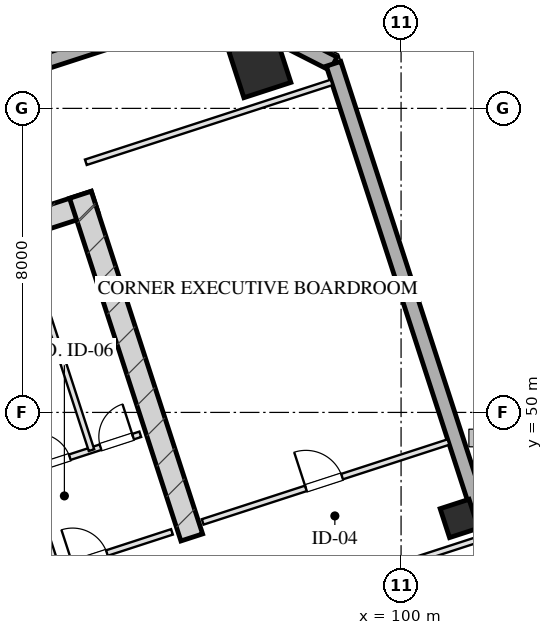
"""IFC4 building model, lengths in metres.
Left out: names, types, materials, properties, quantities, classifications, styles, units other than length and angle.
Written with IfcOpenShell. Run it as: python <this file> out.ifc"""

import sys

from ifc_helpers import new_model, si_unit, direction, frame, frame_2d, origin, origin_2d, place, context, subcontext, project, spatial, rectangle, hollow_rectangle, extrude, element, fill, save


model = new_model("IFC4")
c1 = context("Model", 3, precision=1e-05, world=origin(), true_north=direction((0.0, 1.0)))
c2 = subcontext(c1, "Body", "Model", "MODEL_VIEW")
j1 = project(units=[si_unit("LENGTHUNIT", "METRE"), si_unit("PLANEANGLEUNIT", "RADIAN")], contexts=[c1])
p1 = place(None, origin())
s1 = spatial("IfcSite", under=j1, at=p1, CompositionType="ELEMENT")
p2 = place(p1, origin())
s2 = spatial("IfcBuilding", under=s1, at=p2, CompositionType="ELEMENT")
p3 = place(p2, frame((0.0, 0.0, 163.3)))
s3 = spatial("IfcBuildingStorey", under=s2, at=p3, CompositionType="ELEMENT", Elevation=163.3)
p4 = place(p3, frame((76.344, 50.466, 0.0), z_axis=(0.0, 0.0, 1.0), x_axis=(0.951055727519, 0.309019421968, 0.0)))
e1 = element("IfcWall", 1, at=p4, inside=s3, PredefinedType="SHEAR", context=c2, shape_type="SweptSolid", body=[
    extrude(rectangle(XDim=16.4, YDim=0.6, at=frame_2d((8.2, 0.0))), origin(), (0.0, 0.0, 1.0), 3.45),
])
p5 = place(p3, frame((94.492, 46.71, 0.0), z_axis=(0.0, 0.0, 1.0), x_axis=(-0.309010370028, 0.95105866865, 0.0)))
e2 = element("IfcWall", 2, at=p5, inside=s3, PredefinedType="SHEAR", context=c2, shape_type="SweptSolid", body=[
    extrude(rectangle(XDim=9.48, YDim=0.6, at=frame_2d((4.74, 0.0))), origin(), (0.0, 0.0, 1.0), 3.45),
])
p6 = place(p3, frame((96.281, 59.099, 0.0), z_axis=(0.0, 0.0, 1.0), x_axis=(0.951056516295, 0.309016994375, 0.0)))
e3 = element("IfcColumn", 3, at=p6, inside=s3, PredefinedType="COLUMN", context=c2, shape_type="SweptSolid", body=[
    extrude(hollow_rectangle(XDim=1.3, YDim=1.3, WallThickness=0.045, at=origin_2d()), origin(), (0.0, 0.0, 1.0), 3.451),
])
p7 = place(p3, frame((101.532, 47.21, 0.0), z_axis=(0.0, 0.0, 1.0), x_axis=(0.951056516295, 0.309016994375, 0.0)))
e4 = element("IfcColumn", 4, at=p7, inside=s3, PredefinedType="COLUMN", context=c2, shape_type="SweptSolid", body=[
    extrude(hollow_rectangle(XDim=0.8, YDim=0.8, WallThickness=0.028, at=origin_2d()), origin(), (0.0, 0.0, 1.0), 3.451),
])
p8 = place(p3, frame((70.092, 52.556, 0.0), z_axis=(0.0, 0.0, 1.0), x_axis=(0.951057580055, 0.30901372044, 0.0)))
e5 = element("IfcWall", 5, at=p8, inside=s3, PredefinedType="SOLIDWALL", context=c2, shape_type="SweptSolid", body=[
    extrude(rectangle(XDim=26.4, YDim=0.4, at=frame_2d((13.2, 0.0))), origin(), (0.0, 0.0, 1.0), 2.61),
])
p9 = place(p3, frame((95.199, 60.714, 0.0), z_axis=(0.0, 0.0, 1.0), x_axis=(0.891020832027, -0.453962417932, 0.0)))
e6 = element("IfcWall", 6, at=p9, inside=s3, PredefinedType="SOLIDWALL", context=c2, shape_type="SweptSolid", body=[
    extrude(rectangle(XDim=3.394, YDim=0.4, at=frame_2d((1.697, 0.0))), origin(), (0.0, 0.0, 1.0), 2.61),
])
p10 = place(p3, frame((98.224, 59.173, 0.0), z_axis=(0.0, 0.0, 1.0), x_axis=(0.309014228706, -0.951057414911, 0.0)))
e7 = element("IfcWall", 7, at=p10, inside=s3, PredefinedType="SOLIDWALL", context=c2, shape_type="SweptSolid", body=[
    extrude(rectangle(XDim=42.8, YDim=0.4, at=frame_2d((21.4, 0.0))), origin(), (0.0, 0.0, 1.0), 2.61),
])
p11 = place(p10, frame((26.675, 0.0, 0.75)))
e8 = element("IfcOpeningElement", 8, at=p11, cuts=e7, PredefinedType="OPENING", context=c2, shape_type="SweptSolid", body=[
    extrude(rectangle(XDim=2.25, YDim=1.46, at=frame_2d((1.125, 0.73))), frame((0.0, 0.21, 0.0), z_axis=(0.0, -1.0, 0.0), x_axis=(1.0, 0.0, 0.0)), (0.0, 0.0, 1.0), 0.42),
])
p12 = place(p10, frame((22.875, 0.0, 0.75)))
e9 = element("IfcOpeningElement", 9, at=p12, cuts=e7, PredefinedType="OPENING", context=c2, shape_type="SweptSolid", body=[
    extrude(rectangle(XDim=2.25, YDim=1.46, at=frame_2d((1.125, 0.73))), frame((0.0, 0.21, 0.0), z_axis=(0.0, -1.0, 0.0), x_axis=(1.0, 0.0, 0.0)), (0.0, 0.0, 1.0), 0.42),
])
p13 = place(p10, frame((17.892, 0.0, 0.0)))
e10 = element("IfcOpeningElement", 10, at=p13, cuts=e7, PredefinedType="OPENING", context=c2, shape_type="SweptSolid", body=[
    extrude(rectangle(XDim=1.1, YDim=2.15, at=frame_2d((0.55, 1.075))), frame((0.0, 0.21, 0.0), z_axis=(0.0, -1.0, 0.0), x_axis=(1.0, 0.0, 0.0)), (0.0, 0.0, 1.0), 0.42),
])
p14 = place(p3, frame((90.928, 45.868, 0.0), z_axis=(0.0, 0.0, 1.0), x_axis=(-0.309042196757, 0.951048327176, 0.0)))
e11 = element("IfcWall", 11, at=p14, inside=s3, PredefinedType="PARTITIONING", context=c2, shape_type="SweptSolid", body=[
    extrude(rectangle(XDim=8.43, YDim=0.2, at=frame_2d((4.215, 0.0))), origin(), (0.0, 0.0, 1.0), 3.175),
])
p15 = place(p3, frame((90.928, 45.868, 0.0), z_axis=(0.0, 0.0, 1.0), x_axis=(0.951059297078, 0.309008435874, 0.0)))
e12 = element("IfcWall", 12, at=p15, inside=s3, PredefinedType="PARTITIONING", context=c2, shape_type="SweptSolid", body=[
    extrude(rectangle(XDim=3.2, YDim=0.15, at=frame_2d((1.6, 0.0))), origin(), (0.0, 0.0, 1.0), 3.175),
])
p16 = place(p15, frame((0.45, 0.0, 0.0)))
e13 = element("IfcOpeningElement", 13, at=p16, cuts=e12, PredefinedType="OPENING", context=c2, shape_type="SweptSolid", body=[
    extrude(rectangle(XDim=0.95, YDim=2.05, at=frame_2d((0.475, 1.025))), frame((0.0, 0.085, 0.0), z_axis=(0.0, -1.0, 0.0), x_axis=(1.0, 0.0, 0.0)), (0.0, 0.0, 1.0), 0.17),
])
p17 = place(p3, frame((90.094, 48.436, 0.0), z_axis=(0.0, 0.0, 1.0), x_axis=(0.951066581729, 0.308986014439, 0.0)))
e14 = element("IfcWall", 14, at=p17, inside=s3, PredefinedType="PARTITIONING", context=c2, shape_type="SweptSolid", body=[
    extrude(rectangle(XDim=3.2, YDim=0.15, at=frame_2d((1.6, 0.0))), origin(), (0.0, 0.0, 1.0), 3.175),
])
p18 = place(p17, frame((0.35, 0.0, 0.0)))
e15 = element("IfcOpeningElement", 15, at=p18, cuts=e14, PredefinedType="OPENING", context=c2, shape_type="SweptSolid", body=[
    extrude(rectangle(XDim=0.9, YDim=2.05, at=frame_2d((0.45, 1.025))), frame((0.0, 0.085, 0.0), z_axis=(0.0, -1.0, 0.0), x_axis=(1.0, 0.0, 0.0)), (0.0, 0.0, 1.0), 0.17),
])
p19 = place(p17, frame((2.1, 0.0, 0.0)))
e16 = element("IfcOpeningElement", 16, at=p19, cuts=e14, PredefinedType="OPENING", context=c2, shape_type="SweptSolid", body=[
    extrude(rectangle(XDim=0.9, YDim=2.05, at=frame_2d((0.45, 1.025))), frame((0.0, 0.085, 0.0), z_axis=(0.0, -1.0, 0.0), x_axis=(1.0, 0.0, 0.0)), (0.0, 0.0, 1.0), 0.17),
])
p20 = place(p3, frame((91.853, 49.007, 0.0), z_axis=(0.0, 0.0, 1.0), x_axis=(-0.309022487551, 0.951054731437, 0.0)))
e17 = element("IfcWall", 17, at=p20, inside=s3, PredefinedType="PARTITIONING", context=c2, shape_type="SweptSolid", body=[
    extrude(rectangle(XDim=5.73, YDim=0.15, at=frame_2d((2.865, 0.0))), origin(), (0.0, 0.0, 1.0), 3.175),
])
p21 = place(p3, frame((91.705, 56.582, 0.0), z_axis=(0.0, 0.0, 1.0), x_axis=(0.951057811516, 0.309013008068, 0.0)))
e18 = element("IfcWall", 18, at=p21, inside=s3, PredefinedType="PARTITIONING", context=c2, shape_type="SweptSolid", body=[
    extrude(rectangle(XDim=6.8, YDim=0.15, at=frame_2d((3.4, 0.0))), origin(), (0.0, 0.0, 1.0), 3.175),
])
p22 = place(p3, frame((94.78, 47.119, 0.0), z_axis=(0.0, 0.0, 1.0), x_axis=(0.951057811516, 0.309013008068, 0.0)))
e19 = element("IfcWall", 19, at=p22, inside=s3, PredefinedType="PARTITIONING", context=c2, shape_type="SweptSolid", body=[
    extrude(rectangle(XDim=6.8, YDim=0.15, at=frame_2d((3.4, 0.0))), origin(), (0.0, 0.0, 1.0), 3.175),
])
p23 = place(p22, frame((2.856, 0.0, 0.0)))
e20 = element("IfcOpeningElement", 20, at=p23, cuts=e19, PredefinedType="OPENING", context=c2, shape_type="SweptSolid", body=[
    extrude(rectangle(XDim=1.0, YDim=2.05, at=frame_2d((0.5, 1.025))), frame((0.0, 0.085, 0.0), z_axis=(0.0, -1.0, 0.0), x_axis=(1.0, 0.0, 0.0)), (0.0, 0.0, 1.0), 0.17),
])
p24 = place(p3, frame((91.138, 43.118, 0.0), z_axis=(0.0, 0.0, 1.0), x_axis=(0.951054972381, 0.309021746015, 0.0)))
e21 = element("IfcWall", 21, at=p24, inside=s3, PredefinedType="PARTITIONING", context=c2, shape_type="SweptSolid", body=[
    extrude(rectangle(XDim=11.5, YDim=0.15, at=frame_2d((5.75, 0.0))), origin(), (0.0, 0.0, 1.0), 3.175),
])
p25 = place(p16, origin())
e22 = element("IfcDoor", 22, at=p25, inside=s3, OperationType="SINGLE_SWING_LEFT", PredefinedType="DOOR", context=c2, shape_type="SweptSolid", body=[
    extrude(rectangle(XDim=0.95, YDim=2.05, at=frame_2d((0.475, 1.025))), frame((0.0, 0.025, 0.0), z_axis=(0.0, -1.0, 0.0), x_axis=(1.0, 0.0, 0.0)), (0.0, 0.0, 1.0), 0.05),
])
fill(e13, e22)
p26 = place(p18, origin())
e23 = element("IfcDoor", 23, at=p26, inside=s3, OperationType="SINGLE_SWING_LEFT", PredefinedType="DOOR", context=c2, shape_type="SweptSolid", body=[
    extrude(rectangle(XDim=0.9, YDim=2.05, at=frame_2d((0.45, 1.025))), frame((0.0, 0.025, 0.0), z_axis=(0.0, -1.0, 0.0), x_axis=(1.0, 0.0, 0.0)), (0.0, 0.0, 1.0), 0.05),
])
fill(e15, e23)
p27 = place(p19, origin())
e24 = element("IfcDoor", 24, at=p27, inside=s3, OperationType="SINGLE_SWING_RIGHT", PredefinedType="DOOR", context=c2, shape_type="SweptSolid", body=[
    extrude(rectangle(XDim=0.9, YDim=2.05, at=frame_2d((0.45, 1.025))), frame((0.0, 0.025, 0.0), z_axis=(0.0, -1.0, 0.0), x_axis=(1.0, 0.0, 0.0)), (0.0, 0.0, 1.0), 0.05),
])
fill(e16, e24)
p28 = place(p23, origin())
e25 = element("IfcDoor", 25, at=p28, inside=s3, OperationType="SINGLE_SWING_LEFT", PredefinedType="DOOR", context=c2, shape_type="SweptSolid", body=[
    extrude(rectangle(XDim=1.0, YDim=2.05, at=frame_2d((0.5, 1.025))), frame((0.0, 0.025, 0.0), z_axis=(0.0, -1.0, 0.0), x_axis=(1.0, 0.0, 0.0)), (0.0, 0.0, 1.0), 0.05),
])
fill(e20, e25)
save(model, sys.argv[1])
